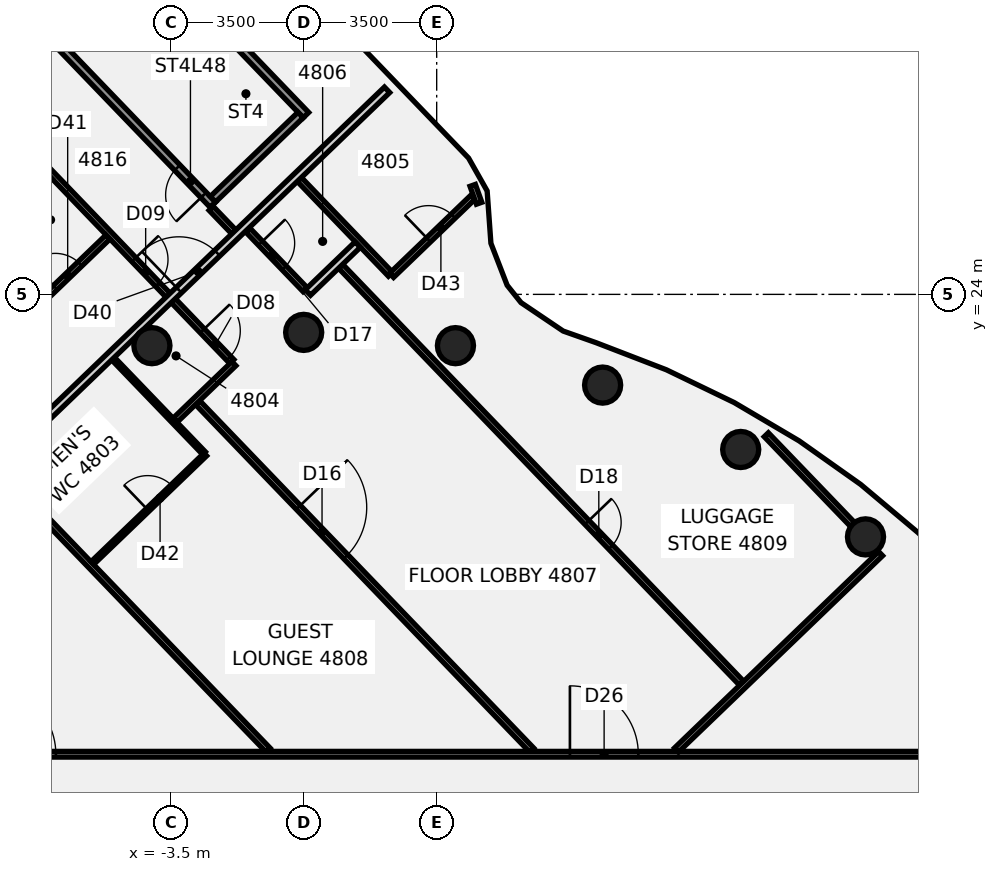
"""IFC4 building model, lengths in metres.
Left out: names, types, materials, properties, quantities, classifications, styles, units other than length and angle.
Written with IfcOpenShell. Run it as: python <this file> out.ifc"""

import sys

from ifc_helpers import new_model, si_unit, direction, frame, frame_2d, origin, origin_2d, place, context, subcontext, project, spatial, rectangle, circle, extrude, element, fill, save


model = new_model("IFC4")
c1 = context("Model", 3, precision=1e-05, world=origin(), true_north=direction((0.0, 1.0)))
c2 = subcontext(c1, "Body", "Model", "MODEL_VIEW")
j1 = project(units=[si_unit("LENGTHUNIT", "METRE"), si_unit("PLANEANGLEUNIT", "RADIAN")], contexts=[c1])
p1 = place(None, origin())
s1 = spatial("IfcSite", under=j1, at=p1, CompositionType="ELEMENT")
p2 = place(p1, origin())
s2 = spatial("IfcBuilding", under=s1, at=p2, CompositionType="ELEMENT")
p3 = place(p2, frame((0.0, 0.0, 193.3)))
s3 = spatial("IfcBuildingStorey", under=s2, at=p3, CompositionType="ELEMENT", Elevation=193.3)
for number, where, z_axis, x_axis in (
    (1, (14.784, 17.619, -0.14), (0.0, 0.0, 1.0), (1.0, 0.0, 0.0)),
    (2, (11.5, 19.919, -0.14), (0.0, 0.0, 1.0), (1.0, 0.0, 0.0)),
    (3, (7.866, 21.613, -0.14), (0.0, 0.0, 1.0), (1.0, 0.0, 0.0)),
    (4, (3.994, 22.651, -0.14), (0.0, 0.0, 1.0), (1.0, 0.0, 0.0)),
    (5, (0.0, 23.0, -0.14), (0.0, 0.0, 1.0), (1.0, 0.0, 0.0)),
    (6, (-3.994, 22.651, -0.14), (0.0, 0.0, 1.0), (1.0, 0.0, 0.0)),
):
    element("IfcColumn", number, at=place(p3, frame(where, z_axis=z_axis, x_axis=x_axis)), inside=s3, PredefinedType="COLUMN", context=c2, shape_type="SweptSolid", body=[
        extrude(circle(Radius=0.475, at=origin_2d()), origin(), (0.0, 0.0, 1.0), 3.6),
    ])
p4 = place(p3, frame((-12.802, 33.58, 0.0), z_axis=(0.0, 0.0, 1.0), x_axis=(0.693112745752, -0.720829190361, 0.0)))
e7 = element("IfcWall", 7, at=p4, inside=s3, PredefinedType="PARTITIONING", context=c2, shape_type="SweptSolid", body=[
    extrude(rectangle(XDim=15.741, YDim=0.15, at=frame_2d((7.87, 0.0))), origin(), (0.0, 0.0, 1.0), 2.864),
])
p5 = place(p4, frame((14.621, 0.0, 0.0)))
e8 = element("IfcOpeningElement", 8, at=p5, cuts=e7, PredefinedType="OPENING", context=c2, shape_type="SweptSolid", body=[
    extrude(rectangle(XDim=1.0, YDim=2.1, at=frame_2d((0.5, 1.05))), frame((0.0, 0.085, 0.0), z_axis=(0.0, -1.0, 0.0), x_axis=(1.0, 0.0, 0.0)), (0.0, 0.0, 1.0), 0.17),
])
p6 = place(p4, frame((12.021, 0.0, 0.0)))
e9 = element("IfcOpeningElement", 9, at=p6, cuts=e7, PredefinedType="OPENING", context=c2, shape_type="SweptSolid", body=[
    extrude(rectangle(XDim=0.9, YDim=2.1, at=frame_2d((0.45, 1.05))), frame((0.0, 0.085, 0.0), z_axis=(0.0, -1.0, 0.0), x_axis=(1.0, 0.0, 0.0)), (0.0, 0.0, 1.0), 0.17),
])
p7 = place(p4, frame((5.32, 0.0, 0.0)))
e10 = element("IfcOpeningElement", 10, at=p7, cuts=e7, PredefinedType="OPENING", context=c2, shape_type="SweptSolid", body=[
    extrude(rectangle(XDim=0.9, YDim=2.1, at=frame_2d((0.45, 1.05))), frame((0.0, 0.085, 0.0), z_axis=(0.0, -1.0, 0.0), x_axis=(1.0, 0.0, 0.0)), (0.0, 0.0, 1.0), 0.17),
])
p8 = place(p4, frame((3.02, 0.0, 0.0)))
e11 = element("IfcOpeningElement", 11, at=p8, cuts=e7, PredefinedType="OPENING", context=c2, shape_type="SweptSolid", body=[
    extrude(rectangle(XDim=0.9, YDim=2.1, at=frame_2d((0.45, 1.05))), frame((0.0, 0.085, 0.0), z_axis=(0.0, -1.0, 0.0), x_axis=(1.0, 0.0, 0.0)), (0.0, 0.0, 1.0), 0.17),
])
p9 = place(p3, frame((-11.358, 22.846, 0.0), z_axis=(0.0, 0.0, 1.0), x_axis=(0.69317166013, -0.720772536652, 0.0)))
e12 = element("IfcWall", 12, at=p9, inside=s3, PredefinedType="PARTITIONING", context=c2, shape_type="SweptSolid", body=[
    extrude(rectangle(XDim=15.037, YDim=0.15, at=frame_2d((7.519, 0.0))), origin(), (0.0, 0.0, 1.0), 2.864),
])
p10 = place(p3, frame((-2.434, 26.263, 0.0), z_axis=(0.0, 0.0, 1.0), x_axis=(0.693057647536, -0.720882165955, 0.0)))
e13 = element("IfcWall", 13, at=p10, inside=s3, PredefinedType="PARTITIONING", context=c2, shape_type="SweptSolid", body=[
    extrude(rectangle(XDim=0.86, YDim=0.15, at=frame_2d((0.43, 0.0))), origin(), (0.0, 0.0, 1.0), 2.864),
])
p11 = place(p3, frame((-5.016, 22.31, 0.0), z_axis=(0.0, 0.0, 1.0), x_axis=(0.693210521717, -0.720735161193, 0.0)))
e14 = element("IfcWall", 14, at=p11, inside=s3, PredefinedType="PARTITIONING", context=c2, shape_type="SweptSolid", body=[
    extrude(rectangle(XDim=3.45, YDim=0.1, at=frame_2d((1.725, 0.0))), origin(), (0.0, 0.0, 1.0), 2.864),
])
p12 = place(p3, frame((-2.789, 21.149, 0.0), z_axis=(0.0, 0.0, 1.0), x_axis=(0.69313987773, -0.720803100646, 0.0)))
e15 = element("IfcWall", 15, at=p12, inside=s3, PredefinedType="PARTITIONING", context=c2, shape_type="SweptSolid", body=[
    extrude(rectangle(XDim=12.682, YDim=0.15, at=frame_2d((6.341, 0.0))), origin(), (0.0, 0.0, 1.0), 2.864),
])
p13 = place(p12, frame((3.82, 0.0, 0.0)))
e16 = element("IfcOpeningElement", 16, at=p13, cuts=e15, PredefinedType="OPENING", context=c2, shape_type="SweptSolid", body=[
    extrude(rectangle(XDim=1.8, YDim=2.1, at=frame_2d((0.9, 1.05))), frame((0.0, 0.085, 0.0), z_axis=(0.0, -1.0, 0.0), x_axis=(1.0, 0.0, 0.0)), (0.0, 0.0, 1.0), 0.17),
])
p14 = place(p3, frame((-1.47, 25.692, 0.0), z_axis=(0.0, 0.0, 1.0), x_axis=(0.693223109089, -0.720723054317, 0.0)))
e17 = element("IfcWall", 17, at=p14, inside=s3, PredefinedType="PARTITIONING", context=c2, shape_type="SweptSolid", body=[
    extrude(rectangle(XDim=2.175, YDim=0.15, at=frame_2d((1.087, 0.0))), origin(), (0.0, 0.0, 1.0), 2.864),
])
p15 = place(p14, frame((0.48, 0.0, 0.0)))
e18 = element("IfcOpeningElement", 18, at=p15, cuts=e17, PredefinedType="OPENING", context=c2, shape_type="SweptSolid", body=[
    extrude(rectangle(XDim=0.9, YDim=2.1, at=frame_2d((0.45, 1.05))), frame((0.0, 0.085, 0.0), z_axis=(0.0, -1.0, 0.0), x_axis=(1.0, 0.0, 0.0)), (0.0, 0.0, 1.0), 0.17),
])
p16 = place(p3, frame((-0.114, 27.024, 0.0), z_axis=(0.0, 0.0, 1.0), x_axis=(0.692997304438, -0.720940175078, 0.0)))
e19 = element("IfcWall", 19, at=p16, inside=s3, PredefinedType="PARTITIONING", context=c2, shape_type="SweptSolid", body=[
    extrude(rectangle(XDim=3.46, YDim=0.15, at=frame_2d((1.73, 0.0))), origin(), (0.0, 0.0, 1.0), 2.864),
])
p17 = place(p3, frame((0.973, 24.739, 0.0), z_axis=(0.0, 0.0, 1.0), x_axis=(0.693135644714, -0.720807171182, 0.0)))
e20 = element("IfcWall", 20, at=p17, inside=s3, PredefinedType="PARTITIONING", context=c2, shape_type="SweptSolid", body=[
    extrude(rectangle(XDim=15.219, YDim=0.15, at=frame_2d((7.61, 0.0))), origin(), (0.0, 0.0, 1.0), 2.864),
])
p18 = place(p17, frame((9.35, 0.0, 0.0)))
e21 = element("IfcOpeningElement", 21, at=p18, cuts=e20, PredefinedType="OPENING", context=c2, shape_type="SweptSolid", body=[
    extrude(rectangle(XDim=0.9, YDim=2.1, at=frame_2d((0.45, 1.05))), frame((0.0, 0.085, 0.0), z_axis=(0.0, -1.0, 0.0), x_axis=(1.0, 0.0, 0.0)), (0.0, 0.0, 1.0), 0.17),
])
p19 = place(p3, frame((12.174, 20.306, 0.0), z_axis=(0.0, 0.0, 1.0), x_axis=(0.693080436315, -0.720860256081, 0.0)))
e22 = element("IfcWall", 22, at=p19, inside=s3, PredefinedType="PARTITIONING", context=c2, shape_type="SweptSolid", body=[
    extrude(rectangle(XDim=3.278, YDim=0.15, at=frame_2d((1.639, 0.0))), origin(), (0.0, 0.0, 1.0), 2.864),
])
p20 = place(p3, frame((-17.065, 11.9, 0.0), z_axis=(0.0, 0.0, 1.0), x_axis=(1.0, 0.0, 0.0)))
e23 = element("IfcWall", 23, at=p20, inside=s3, PredefinedType="PARTITIONING", context=c2, shape_type="SweptSolid", body=[
    extrude(rectangle(XDim=34.165, YDim=0.15, at=frame_2d((17.083, 0.0))), origin(), (0.0, 0.0, 1.0), 2.864),
])
p21 = place(p20, frame((24.071, 0.0, 0.0)))
e24 = element("IfcOpeningElement", 24, at=p21, cuts=e23, PredefinedType="OPENING", context=c2, shape_type="SweptSolid", body=[
    extrude(rectangle(XDim=1.8, YDim=2.1, at=frame_2d((0.9, 1.05))), frame((0.0, 0.085, 0.0), z_axis=(0.0, -1.0, 0.0), x_axis=(1.0, 0.0, 0.0)), (0.0, 0.0, 1.0), 0.17),
])
p22 = place(p20, frame((8.744, 0.0, 0.0)))
e25 = element("IfcOpeningElement", 25, at=p22, cuts=e23, PredefinedType="OPENING", context=c2, shape_type="SweptSolid", body=[
    extrude(rectangle(XDim=1.8, YDim=2.1, at=frame_2d((0.9, 1.05))), frame((0.0, 0.085, 0.0), z_axis=(0.0, -1.0, 0.0), x_axis=(1.0, 0.0, 0.0)), (0.0, 0.0, 1.0), 0.17),
])
p23 = place(p20, frame((3.194, 0.0, 0.0)))
e26 = element("IfcOpeningElement", 26, at=p23, cuts=e23, PredefinedType="OPENING", context=c2, shape_type="SweptSolid", body=[
    extrude(rectangle(XDim=1.8, YDim=2.1, at=frame_2d((0.9, 1.05))), frame((0.0, 0.085, 0.0), z_axis=(0.0, -1.0, 0.0), x_axis=(1.0, 0.0, 0.0)), (0.0, 0.0, 1.0), 0.17),
])
p24 = place(p3, frame((-8.054, 19.527, 0.0), z_axis=(0.0, 0.0, 1.0), x_axis=(0.72077697185, 0.693167048301, 0.0)))
e27 = element("IfcWall", 27, at=p24, inside=s3, PredefinedType="PARTITIONING", context=c2, shape_type="SweptSolid", body=[
    extrude(rectangle(XDim=14.219, YDim=0.2, at=frame_2d((7.109, 0.0))), origin(), (0.0, 0.0, 1.0), 2.864),
])
p25 = place(p24, frame((6.62, 0.0, 0.0)))
e28 = element("IfcOpeningElement", 28, at=p25, cuts=e27, PredefinedType="OPENING", context=c2, shape_type="SweptSolid", body=[
    extrude(rectangle(XDim=1.4, YDim=2.1, at=frame_2d((0.7, 1.05))), frame((0.0, 0.11, 0.0), z_axis=(0.0, -1.0, 0.0), x_axis=(1.0, 0.0, 0.0)), (0.0, 0.0, 1.0), 0.22),
])
p26 = place(p3, frame((-6.967, 23.763, 0.0), z_axis=(0.0, 0.0, 1.0), x_axis=(0.720825617884, 0.693116461067, 0.0)))
e29 = element("IfcWall", 29, at=p26, inside=s3, PredefinedType="PARTITIONING", context=c2, shape_type="SweptSolid", body=[
    extrude(rectangle(XDim=2.52, YDim=0.15, at=frame_2d((1.26, 0.0))), origin(), (0.0, 0.0, 1.0), 2.864),
])
p27 = place(p26, frame((0.6, 0.0, 0.0)))
e30 = element("IfcOpeningElement", 30, at=p27, cuts=e29, PredefinedType="OPENING", context=c2, shape_type="SweptSolid", body=[
    extrude(rectangle(XDim=0.9, YDim=2.1, at=frame_2d((0.45, 1.05))), frame((0.0, 0.085, 0.0), z_axis=(0.0, -1.0, 0.0), x_axis=(1.0, 0.0, 0.0)), (0.0, 0.0, 1.0), 0.17),
])
p28 = place(p3, frame((-5.559, 16.931, 0.0), z_axis=(0.0, 0.0, 1.0), x_axis=(0.720864944765, 0.693075559668, 0.0)))
e31 = element("IfcWall", 31, at=p28, inside=s3, PredefinedType="PARTITIONING", context=c2, shape_type="SweptSolid", body=[
    extrude(rectangle(XDim=4.12, YDim=0.1, at=frame_2d((2.06, 0.0))), origin(), (0.0, 0.0, 1.0), 2.864),
])
p29 = place(p28, frame((2.02, 0.0, 0.0)))
e32 = element("IfcOpeningElement", 32, at=p29, cuts=e31, PredefinedType="OPENING", context=c2, shape_type="SweptSolid", body=[
    extrude(rectangle(XDim=0.9, YDim=2.1, at=frame_2d((0.45, 1.05))), frame((0.0, 0.06, 0.0), z_axis=(0.0, -1.0, 0.0), x_axis=(1.0, 0.0, 0.0)), (0.0, 0.0, 1.0), 0.12),
])
p30 = place(p3, frame((2.313, 24.5, 0.0), z_axis=(0.0, 0.0, 1.0), x_axis=(0.720888289897, 0.693051277677, 0.0)))
e33 = element("IfcWall", 33, at=p30, inside=s3, PredefinedType="PARTITIONING", context=c2, shape_type="SweptSolid", body=[
    extrude(rectangle(XDim=2.973, YDim=0.15, at=frame_2d((1.487, 0.0))), origin(), (0.0, 0.0, 1.0), 2.864),
])
p31 = place(p30, frame((1.35, 0.0, 0.0)))
e34 = element("IfcOpeningElement", 34, at=p31, cuts=e33, PredefinedType="OPENING", context=c2, shape_type="SweptSolid", body=[
    extrude(rectangle(XDim=0.9, YDim=2.1, at=frame_2d((0.45, 1.05))), frame((0.0, 0.085, 0.0), z_axis=(0.0, -1.0, 0.0), x_axis=(1.0, 0.0, 0.0)), (0.0, 0.0, 1.0), 0.17),
])
p32 = place(p3, frame((-3.378, 20.694, 0.0), z_axis=(0.0, 0.0, 1.0), x_axis=(0.720719068909, 0.693227252574, 0.0)))
e35 = element("IfcWall", 35, at=p32, inside=s3, PredefinedType="PARTITIONING", context=c2, shape_type="SweptSolid", body=[
    extrude(rectangle(XDim=2.14, YDim=0.15, at=frame_2d((1.07, 0.0))), origin(), (0.0, 0.0, 1.0), 2.864),
])
p33 = place(p3, frame((0.111, 24.049, 0.0), z_axis=(0.0, 0.0, 1.0), x_axis=(0.72079181053, 0.693151618243, 0.0)))
e36 = element("IfcWall", 36, at=p33, inside=s3, PredefinedType="PARTITIONING", context=c2, shape_type="SweptSolid", body=[
    extrude(rectangle(XDim=1.82, YDim=0.2, at=frame_2d((0.91, 0.0))), origin(), (0.0, 0.0, 1.0), 2.864),
])
p34 = place(p3, frame((9.81, 12.011, 0.0), z_axis=(0.0, 0.0, 1.0), x_axis=(0.720763816656, 0.693180727227, 0.0)))
e37 = element("IfcWall", 37, at=p34, inside=s3, PredefinedType="PARTITIONING", context=c2, shape_type="SweptSolid", body=[
    extrude(rectangle(XDim=7.453, YDim=0.15, at=frame_2d((3.726, 0.0))), origin(), (0.0, 0.0, 1.0), 2.864),
])
p35 = place(p3, frame((4.617, 26.398, 0.0), z_axis=(0.0, 0.0, 1.0), x_axis=(-0.337387824728, 0.941365739617, 0.0)))
e38 = element("IfcWall", 38, at=p35, inside=s3, PredefinedType="PARTITIONING", context=c2, shape_type="SweptSolid", body=[
    extrude(rectangle(XDim=0.5, YDim=0.15, at=frame_2d((0.25, 0.0))), origin(), (0.0, 0.0, 1.0), 2.864),
])
p36 = place(p3, frame((-2.39, 26.361, -0.14), z_axis=(0.0, 0.0, 1.0), x_axis=(-0.693180078499, 0.720764440557, 0.0)))
e39 = element("IfcWall", 39, at=p36, inside=s3, PredefinedType="SHEAR", context=c2, shape_type="SweptSolid", body=[
    extrude(rectangle(XDim=6.7, YDim=0.2, at=frame_2d((3.35, 0.0))), origin(), (0.0, 0.0, 1.0), 3.004),
])
p37 = place(p36, frame((0.35, 0.0, 0.0)))
e40 = element("IfcOpeningElement", 40, at=p37, cuts=e39, PredefinedType="OPENING", context=c2, shape_type="SweptSolid", body=[
    extrude(rectangle(XDim=1.0, YDim=2.1, at=frame_2d((0.5, 1.05))), frame((0.0, 0.11, 0.0), z_axis=(0.0, -1.0, 0.0), x_axis=(1.0, 0.0, 0.0)), (0.0, 0.0, 1.0), 0.22),
])
p38 = place(p3, frame((0.06, 28.718, -0.14), z_axis=(0.0, 0.0, 1.0), x_axis=(-0.693142941817, 0.720800154141, 0.0)))
e41 = element("IfcWall", 41, at=p38, inside=s3, PredefinedType="SHEAR", context=c2, shape_type="SweptSolid", body=[
    extrude(rectangle(XDim=6.7, YDim=0.2, at=frame_2d((3.35, 0.0))), origin(), (0.0, 0.0, 1.0), 3.004),
])
p39 = place(p3, frame((-0.081, 28.72, -0.14), z_axis=(0.0, 0.0, 1.0), x_axis=(-0.720743629681, -0.693201716872, 0.0)))
e42 = element("IfcWall", 42, at=p39, inside=s3, PredefinedType="SHEAR", context=c2, shape_type="SweptSolid", body=[
    extrude(rectangle(XDim=3.2, YDim=0.2, at=frame_2d((1.6, 0.0))), origin(), (0.0, 0.0, 1.0), 3.004),
])
p40 = place(p5, frame((1.0, 0.0, 0.0), z_axis=(0.0, 0.0, 1.0), x_axis=(-1.0, 0.0, 0.0)))
e43 = element("IfcDoor", 43, at=p40, inside=s3, OperationType="SINGLE_SWING_RIGHT", PredefinedType="DOOR", context=c2, shape_type="SweptSolid", body=[
    extrude(rectangle(XDim=1.0, YDim=2.1, at=frame_2d((0.5, 1.05))), frame((0.0, 0.025, 0.0), z_axis=(0.0, -1.0, 0.0), x_axis=(1.0, 0.0, 0.0)), (0.0, 0.0, 1.0), 0.05),
])
fill(e8, e43)
p41 = place(p6, frame((0.9, 0.0, 0.0), z_axis=(0.0, 0.0, 1.0), x_axis=(-1.0, 0.0, 0.0)))
e44 = element("IfcDoor", 44, at=p41, inside=s3, OperationType="SINGLE_SWING_RIGHT", PredefinedType="DOOR", context=c2, shape_type="SweptSolid", body=[
    extrude(rectangle(XDim=0.9, YDim=2.1, at=frame_2d((0.45, 1.05))), frame((0.0, 0.025, 0.0), z_axis=(0.0, -1.0, 0.0), x_axis=(1.0, 0.0, 0.0)), (0.0, 0.0, 1.0), 0.05),
])
fill(e9, e44)
p42 = place(p13, frame((1.8, 0.0, 0.0), z_axis=(0.0, 0.0, 1.0), x_axis=(-1.0, 0.0, 0.0)))
e45 = element("IfcDoor", 45, at=p42, inside=s3, OperationType="DOUBLE_DOOR_SINGLE_SWING", PredefinedType="DOOR", context=c2, shape_type="SweptSolid", body=[
    extrude(rectangle(XDim=1.8, YDim=2.1, at=frame_2d((0.9, 1.05))), frame((0.0, 0.025, 0.0), z_axis=(0.0, -1.0, 0.0), x_axis=(1.0, 0.0, 0.0)), (0.0, 0.0, 1.0), 0.05),
])
fill(e16, e45)
p43 = place(p15, origin())
e46 = element("IfcDoor", 46, at=p43, inside=s3, OperationType="SINGLE_SWING_RIGHT", PredefinedType="DOOR", context=c2, shape_type="SweptSolid", body=[
    extrude(rectangle(XDim=0.9, YDim=2.1, at=frame_2d((0.45, 1.05))), frame((0.0, 0.025, 0.0), z_axis=(0.0, -1.0, 0.0), x_axis=(1.0, 0.0, 0.0)), (0.0, 0.0, 1.0), 0.05),
])
fill(e18, e46)
p44 = place(p18, origin())
e47 = element("IfcDoor", 47, at=p44, inside=s3, OperationType="SINGLE_SWING_LEFT", PredefinedType="DOOR", context=c2, shape_type="SweptSolid", body=[
    extrude(rectangle(XDim=0.9, YDim=2.1, at=frame_2d((0.45, 1.05))), frame((0.0, 0.025, 0.0), z_axis=(0.0, -1.0, 0.0), x_axis=(1.0, 0.0, 0.0)), (0.0, 0.0, 1.0), 0.05),
])
fill(e21, e47)
p45 = place(p21, frame((1.8, 0.0, 0.0), z_axis=(0.0, 0.0, 1.0), x_axis=(-1.0, 0.0, 0.0)))
e48 = element("IfcDoor", 48, at=p45, inside=s3, OperationType="DOUBLE_DOOR_SINGLE_SWING", PredefinedType="DOOR", context=c2, shape_type="SweptSolid", body=[
    extrude(rectangle(XDim=1.8, YDim=2.1, at=frame_2d((0.9, 1.05))), frame((0.0, 0.025, 0.0), z_axis=(0.0, -1.0, 0.0), x_axis=(1.0, 0.0, 0.0)), (0.0, 0.0, 1.0), 0.05),
])
fill(e24, e48)
p46 = place(p22, origin())
e49 = element("IfcDoor", 49, at=p46, inside=s3, OperationType="DOUBLE_DOOR_SINGLE_SWING", PredefinedType="DOOR", context=c2, shape_type="SweptSolid", body=[
    extrude(rectangle(XDim=1.8, YDim=2.1, at=frame_2d((0.9, 1.05))), frame((0.0, 0.025, 0.0), z_axis=(0.0, -1.0, 0.0), x_axis=(1.0, 0.0, 0.0)), (0.0, 0.0, 1.0), 0.05),
])
fill(e25, e49)
p47 = place(p25, frame((1.4, 0.0, 0.0), z_axis=(0.0, 0.0, 1.0), x_axis=(-1.0, 0.0, 0.0)))
e50 = element("IfcDoor", 50, at=p47, inside=s3, OperationType="DOUBLE_DOOR_SINGLE_SWING", PredefinedType="DOOR", context=c2, shape_type="SweptSolid", body=[
    extrude(rectangle(XDim=1.4, YDim=2.1, at=frame_2d((0.7, 1.05))), frame((0.0, 0.025, 0.0), z_axis=(0.0, -1.0, 0.0), x_axis=(1.0, 0.0, 0.0)), (0.0, 0.0, 1.0), 0.05),
])
fill(e28, e50)
p48 = place(p27, origin())
e51 = element("IfcDoor", 51, at=p48, inside=s3, OperationType="SINGLE_SWING_RIGHT", PredefinedType="DOOR", context=c2, shape_type="SweptSolid", body=[
    extrude(rectangle(XDim=0.9, YDim=2.1, at=frame_2d((0.45, 1.05))), frame((0.0, 0.025, 0.0), z_axis=(0.0, -1.0, 0.0), x_axis=(1.0, 0.0, 0.0)), (0.0, 0.0, 1.0), 0.05),
])
fill(e30, e51)
p49 = place(p29, origin())
e52 = element("IfcDoor", 52, at=p49, inside=s3, OperationType="SINGLE_SWING_LEFT", PredefinedType="DOOR", context=c2, shape_type="SweptSolid", body=[
    extrude(rectangle(XDim=0.9, YDim=2.1, at=frame_2d((0.45, 1.05))), frame((0.0, 0.025, 0.0), z_axis=(0.0, -1.0, 0.0), x_axis=(1.0, 0.0, 0.0)), (0.0, 0.0, 1.0), 0.05),
])
fill(e32, e52)
p50 = place(p31, origin())
e53 = element("IfcDoor", 53, at=p50, inside=s3, OperationType="SINGLE_SWING_LEFT", PredefinedType="DOOR", context=c2, shape_type="SweptSolid", body=[
    extrude(rectangle(XDim=0.9, YDim=2.1, at=frame_2d((0.45, 1.05))), frame((0.0, 0.025, 0.0), z_axis=(0.0, -1.0, 0.0), x_axis=(1.0, 0.0, 0.0)), (0.0, 0.0, 1.0), 0.05),
])
fill(e34, e53)
p51 = place(p37, origin())
e54 = element("IfcDoor", 54, at=p51, inside=s3, OperationType="SINGLE_SWING_LEFT", PredefinedType="DOOR", context=c2, shape_type="SweptSolid", body=[
    extrude(rectangle(XDim=1.0, YDim=2.1, at=frame_2d((0.5, 1.05))), frame((0.0, 0.025, 0.0), z_axis=(0.0, -1.0, 0.0), x_axis=(1.0, 0.0, 0.0)), (0.0, 0.0, 1.0), 0.05),
])
fill(e40, e54)
save(model, sys.argv[1])
